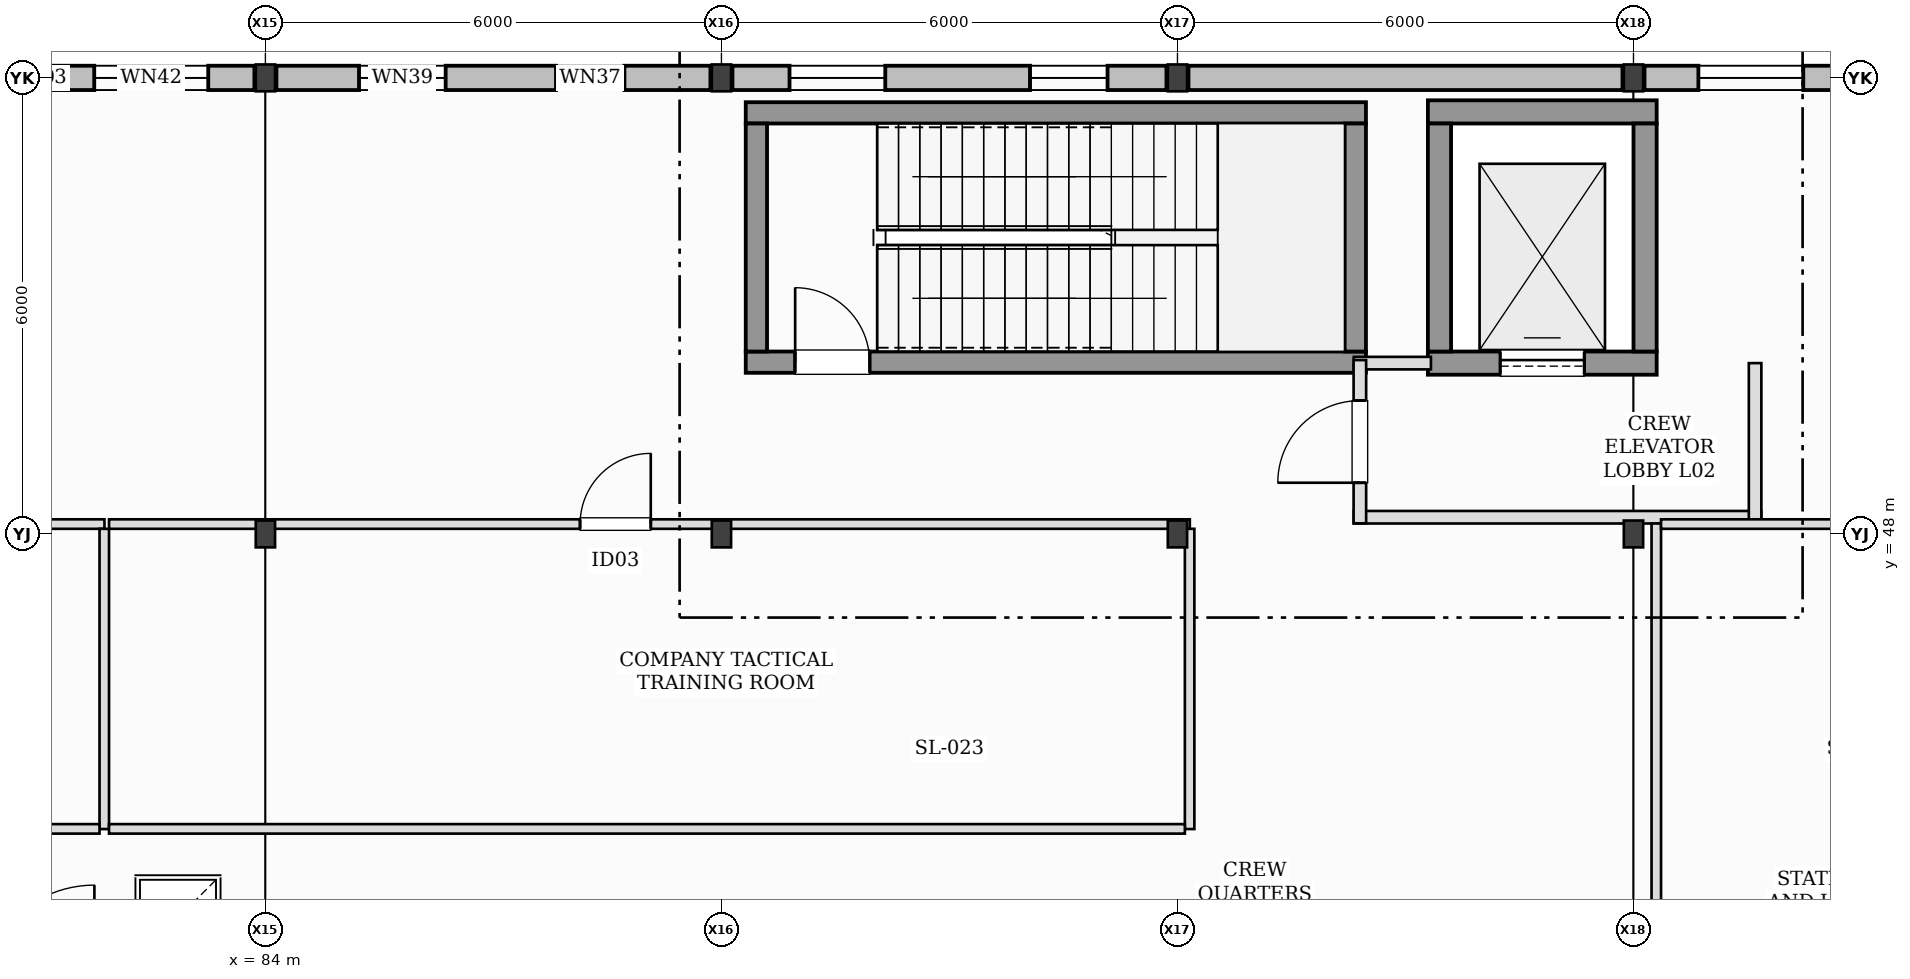
"""IFC4 building model, lengths in metres.
Left out: names, types, materials, properties, quantities, classifications, styles, units other than length and angle.
Written with IfcOpenShell. Run it as: python <this file> out.ifc"""

import sys

from ifc_helpers import new_model, si_unit, direction, frame, frame_2d, origin, origin_2d, place, context, subcontext, project, spatial, rectangle, i_section, extrude, element, fill, save


model = new_model("IFC4")
c1 = context("Model", 3, precision=1e-05, world=origin(), true_north=direction((0.0, 1.0)))
c2 = subcontext(c1, "Body", "Model", "MODEL_VIEW")
j1 = project(units=[si_unit("LENGTHUNIT", "METRE"), si_unit("PLANEANGLEUNIT", "RADIAN")], contexts=[c1])
p1 = place(None, origin())
s1 = spatial("IfcSite", under=j1, at=p1, CompositionType="ELEMENT")
p2 = place(p1, origin())
s2 = spatial("IfcBuilding", under=s1, at=p2, CompositionType="ELEMENT")
p3 = place(p2, frame((0.0, 0.0, 6.0)))
s3 = spatial("IfcBuildingStorey", under=s2, at=p3, CompositionType="ELEMENT", Elevation=6.0)
for number, where, z_axis, x_axis in (
    (1, (84.0, 48.0, 0.0), (0.0, 0.0, 1.0), (1.0, 0.0, 0.0)),
    (2, (84.0, 54.0, 0.0), (0.0, 0.0, 1.0), (1.0, 0.0, 0.0)),
    (3, (90.0, 48.0, 0.0), (0.0, 0.0, 1.0), (1.0, 0.0, 0.0)),
    (4, (90.0, 54.0, 0.0), (0.0, 0.0, 1.0), (1.0, 0.0, 0.0)),
    (5, (96.0, 48.0, 0.0), (0.0, 0.0, 1.0), (1.0, 0.0, 0.0)),
    (6, (96.0, 54.0, 0.0), (0.0, 0.0, 1.0), (1.0, 0.0, 0.0)),
    (7, (102.0, 48.0, 0.0), (0.0, 0.0, 1.0), (1.0, 0.0, 0.0)),
    (8, (102.0, 54.0, 0.0), (0.0, 0.0, 1.0), (1.0, 0.0, 0.0)),
):
    element("IfcColumn", number, at=place(p3, frame(where, z_axis=z_axis, x_axis=x_axis)), inside=s3, PredefinedType="COLUMN", context=c2, shape_type="SweptSolid", body=[
        extrude(i_section(OverallWidth=0.254, OverallDepth=0.353, WebThickness=0.01, FlangeThickness=0.016, at=origin_2d()), origin(), (0.0, 0.0, 1.0), 4.0),
    ])
p4 = place(p3, frame((83.855, 54.0, 0.0), z_axis=(0.0, 0.0, 1.0), x_axis=(-1.0, 0.0, 0.0)))
e9 = element("IfcWall", 9, at=p4, inside=s3, PredefinedType="STANDARD", context=c2, shape_type="SweptSolid", body=[
    extrude(rectangle(XDim=5.71, YDim=0.32, at=frame_2d((2.855, 0.0))), origin(), (0.0, 0.0, 1.0), 3.153),
])
p5 = place(p4, frame((0.607, 0.0, 0.86)))
e10 = element("IfcOpeningElement", 10, at=p5, cuts=e9, PredefinedType="OPENING", context=c2, shape_type="SweptSolid", body=[
    extrude(rectangle(XDim=1.5, YDim=1.5, at=frame_2d((0.75, 0.75))), frame((0.0, 0.17, 0.0), z_axis=(0.0, -1.0, 0.0), x_axis=(1.0, 0.0, 0.0)), (0.0, 0.0, 1.0), 0.34),
])
p6 = place(p4, frame((3.855, 0.0, 1.42)))
e11 = element("IfcOpeningElement", 11, at=p6, cuts=e9, PredefinedType="OPENING", context=c2, shape_type="SweptSolid", body=[
    extrude(rectangle(XDim=1.02, YDim=1.02, at=frame_2d((0.51, 0.51))), frame((0.0, 0.17, 0.0), z_axis=(0.0, -1.0, 0.0), x_axis=(1.0, 0.0, 0.0)), (0.0, 0.0, 1.0), 0.34),
])
p7 = place(p3, frame((89.855, 54.0, 0.0), z_axis=(0.0, 0.0, 1.0), x_axis=(-1.0, 0.0, 0.0)))
e12 = element("IfcWall", 12, at=p7, inside=s3, PredefinedType="STANDARD", context=c2, shape_type="SweptSolid", body=[
    extrude(rectangle(XDim=5.71, YDim=0.32, at=frame_2d((2.855, 0.0))), origin(), (0.0, 0.0, 1.0), 3.153),
])
p8 = place(p7, frame((1.131, 0.0, 1.18)))
e13 = element("IfcOpeningElement", 13, at=p8, cuts=e12, PredefinedType="OPENING", context=c2, shape_type="SweptSolid", body=[
    extrude(rectangle(XDim=0.9, YDim=0.9, at=frame_2d((0.45, 0.45))), frame((0.0, 0.17, 0.0), z_axis=(0.0, -1.0, 0.0), x_axis=(1.0, 0.0, 0.0)), (0.0, 0.0, 1.0), 0.34),
])
p9 = place(p7, frame((3.483, 0.0, 0.96)))
e14 = element("IfcOpeningElement", 14, at=p9, cuts=e12, PredefinedType="OPENING", context=c2, shape_type="SweptSolid", body=[
    extrude(rectangle(XDim=1.14, YDim=1.14, at=frame_2d((0.57, 0.57))), frame((0.0, 0.17, 0.0), z_axis=(0.0, -1.0, 0.0), x_axis=(1.0, 0.0, 0.0)), (0.0, 0.0, 1.0), 0.34),
])
p10 = place(p3, frame((95.855, 54.0, 0.0), z_axis=(0.0, 0.0, 1.0), x_axis=(-1.0, 0.0, 0.0)))
e15 = element("IfcWall", 15, at=p10, inside=s3, PredefinedType="STANDARD", context=c2, shape_type="SweptSolid", body=[
    extrude(rectangle(XDim=5.71, YDim=0.32, at=frame_2d((2.855, 0.0))), origin(), (0.0, 0.0, 1.0), 3.153),
])
p11 = place(p10, frame((0.775, 0.0, 1.42)))
e16 = element("IfcOpeningElement", 16, at=p11, cuts=e15, PredefinedType="OPENING", context=c2, shape_type="SweptSolid", body=[
    extrude(rectangle(XDim=1.02, YDim=1.02, at=frame_2d((0.51, 0.51))), frame((0.0, 0.17, 0.0), z_axis=(0.0, -1.0, 0.0), x_axis=(1.0, 0.0, 0.0)), (0.0, 0.0, 1.0), 0.34),
])
p12 = place(p10, frame((3.699, 0.0, 1.28)))
e17 = element("IfcOpeningElement", 17, at=p12, cuts=e15, PredefinedType="OPENING", context=c2, shape_type="SweptSolid", body=[
    extrude(rectangle(XDim=1.26, YDim=1.26, at=frame_2d((0.63, 0.63))), frame((0.0, 0.17, 0.0), z_axis=(0.0, -1.0, 0.0), x_axis=(1.0, 0.0, 0.0)), (0.0, 0.0, 1.0), 0.34),
])
p13 = place(p3, frame((101.855, 54.0, 0.0), z_axis=(0.0, 0.0, 1.0), x_axis=(-1.0, 0.0, 0.0)))
e18 = element("IfcWall", 18, at=p13, inside=s3, PredefinedType="STANDARD", context=c2, shape_type="SweptSolid", body=[
    extrude(rectangle(XDim=5.71, YDim=0.32, at=frame_2d((2.855, 0.0))), origin(), (0.0, 0.0, 1.0), 3.153),
])
p14 = place(p3, frame((107.855, 54.0, 0.0), z_axis=(0.0, 0.0, 1.0), x_axis=(-1.0, 0.0, 0.0)))
e19 = element("IfcWall", 19, at=p14, inside=s3, PredefinedType="STANDARD", context=c2, shape_type="SweptSolid", body=[
    extrude(rectangle(XDim=5.71, YDim=0.32, at=frame_2d((2.855, 0.0))), origin(), (0.0, 0.0, 1.0), 3.153),
])
p15 = place(p14, frame((0.733, 0.0, 1.28)))
e20 = element("IfcOpeningElement", 20, at=p15, cuts=e19, PredefinedType="OPENING", context=c2, shape_type="SweptSolid", body=[
    extrude(rectangle(XDim=1.14, YDim=1.14, at=frame_2d((0.57, 0.57))), frame((0.0, 0.17, 0.0), z_axis=(0.0, -1.0, 0.0), x_axis=(1.0, 0.0, 0.0)), (0.0, 0.0, 1.0), 0.34),
])
p16 = place(p14, frame((3.621, 0.0, 1.18)))
e21 = element("IfcOpeningElement", 21, at=p16, cuts=e19, PredefinedType="OPENING", context=c2, shape_type="SweptSolid", body=[
    extrude(rectangle(XDim=1.38, YDim=1.38, at=frame_2d((0.69, 0.69))), frame((0.0, 0.17, 0.0), z_axis=(0.0, -1.0, 0.0), x_axis=(1.0, 0.0, 0.0)), (0.0, 0.0, 1.0), 0.34),
])
p17 = place(p3, frame((90.32, 50.26, 0.0), z_axis=(0.0, 0.0, 1.0), x_axis=(1.0, 0.0, 0.0)))
e22 = element("IfcWall", 22, at=p17, inside=s3, PredefinedType="SHEAR", context=c2, shape_type="SweptSolid", body=[
    extrude(rectangle(XDim=8.16, YDim=0.28, at=frame_2d((4.08, 0.0))), origin(), (0.0, 0.0, 1.0), 4.0),
])
p18 = place(p17, frame((0.65, 0.0, 0.0)))
e23 = element("IfcOpeningElement", 23, at=p18, cuts=e22, PredefinedType="OPENING", context=c2, shape_type="SweptSolid", body=[
    extrude(rectangle(XDim=0.98, YDim=2.15, at=frame_2d((0.49, 1.075))), frame((0.0, 0.15, 0.0), z_axis=(0.0, -1.0, 0.0), x_axis=(1.0, 0.0, 0.0)), (0.0, 0.0, 1.0), 0.3),
])
p19 = place(p3, frame((98.48, 53.54, 0.0), z_axis=(0.0, 0.0, 1.0), x_axis=(-1.0, 0.0, 0.0)))
e24 = element("IfcWall", 24, at=p19, inside=s3, PredefinedType="SHEAR", context=c2, shape_type="SweptSolid", body=[
    extrude(rectangle(XDim=8.16, YDim=0.28, at=frame_2d((4.08, 0.0))), origin(), (0.0, 0.0, 1.0), 4.0),
])
for number, where, z_axis, x_axis in (
    (25, (90.46, 53.4, 0.0), (0.0, 0.0, 1.0), (0.0, -1.0, 0.0)),
    (26, (98.34, 50.4, 0.0), (0.0, 0.0, 1.0), (0.0, 1.0, 0.0)),
):
    element("IfcWall", number, at=place(p3, frame(where, z_axis=z_axis, x_axis=x_axis)), inside=s3, PredefinedType="SHEAR", context=c2, shape_type="SweptSolid", body=[
        extrude(rectangle(XDim=3.0, YDim=0.28, at=frame_2d((1.5, 0.0))), origin(), (0.0, 0.0, 1.0), 4.0),
    ])
p20 = place(p3, frame((99.295, 50.248, 0.0), z_axis=(0.0, 0.0, 1.0), x_axis=(1.0, 0.0, 0.0)))
e27 = element("IfcWall", 27, at=p20, inside=s3, PredefinedType="SHEAR", context=c2, shape_type="SweptSolid", body=[
    extrude(rectangle(XDim=3.01, YDim=0.305, at=frame_2d((1.505, 0.0))), origin(), (0.0, 0.0, 1.0), 4.0),
])
p21 = place(p20, frame((0.955, 0.0, 0.0)))
e28 = element("IfcOpeningElement", 28, at=p21, cuts=e27, PredefinedType="OPENING", context=c2, shape_type="SweptSolid", body=[
    extrude(rectangle(XDim=1.1, YDim=2.15, at=frame_2d((0.55, 1.075))), frame((0.0, 0.162, 0.0), z_axis=(0.0, -1.0, 0.0), x_axis=(1.0, 0.0, 0.0)), (0.0, 0.0, 1.0), 0.325),
])
p22 = place(p3, frame((102.305, 53.552, 0.0), z_axis=(0.0, 0.0, 1.0), x_axis=(-1.0, 0.0, 0.0)))
e29 = element("IfcWall", 29, at=p22, inside=s3, PredefinedType="SHEAR", context=c2, shape_type="SweptSolid", body=[
    extrude(rectangle(XDim=3.01, YDim=0.305, at=frame_2d((1.505, 0.0))), origin(), (0.0, 0.0, 1.0), 4.0),
])
for number, where, z_axis, x_axis in (
    (30, (99.448, 53.4, 0.0), (0.0, 0.0, 1.0), (0.0, -1.0, 0.0)),
    (31, (102.153, 50.4, 0.0), (0.0, 0.0, 1.0), (0.0, 1.0, 0.0)),
):
    element("IfcWall", number, at=place(p3, frame(where, z_axis=z_axis, x_axis=x_axis)), inside=s3, PredefinedType="SHEAR", context=c2, shape_type="SweptSolid", body=[
        extrude(rectangle(XDim=3.0, YDim=0.305, at=frame_2d((1.5, 0.0))), origin(), (0.0, 0.0, 1.0), 4.0),
    ])
p23 = place(p3, frame((98.32, 48.22, 0.0), z_axis=(0.0, 0.0, 1.0), x_axis=(1.0, 0.0, 0.0)))
e32 = element("IfcWall", 32, at=p23, inside=s3, PredefinedType="PARTITIONING", context=c2, shape_type="SweptSolid", body=[
    extrude(rectangle(XDim=5.36, YDim=0.165, at=frame_2d((2.68, 0.0))), origin(), (0.0, 0.0, 1.0), 3.153),
])
p24 = place(p3, frame((103.6, 48.14, 0.0), z_axis=(0.0, 0.0, 1.0), x_axis=(0.0, 1.0, 0.0)))
e33 = element("IfcWall", 33, at=p24, inside=s3, PredefinedType="PARTITIONING", context=c2, shape_type="SweptSolid", body=[
    extrude(rectangle(XDim=2.108, YDim=0.165, at=frame_2d((1.054, 0.0))), origin(), (0.0, 0.0, 1.0), 3.72),
])
p25 = place(p3, frame((98.32, 50.248, 0.0), z_axis=(0.0, 0.0, 1.0), x_axis=(1.0, 0.0, 0.0)))
e34 = element("IfcWall", 34, at=p25, inside=s3, PredefinedType="PARTITIONING", context=c2, shape_type="SweptSolid", body=[
    extrude(rectangle(XDim=1.015, YDim=0.165, at=frame_2d((0.507, 0.0))), origin(), (0.0, 0.0, 1.0), 3.72),
])
p26 = place(p3, frame((98.4, 48.14, 0.0), z_axis=(0.0, 0.0, 1.0), x_axis=(0.0, 1.0, 0.0)))
e35 = element("IfcWall", 35, at=p26, inside=s3, PredefinedType="PARTITIONING", context=c2, shape_type="SweptSolid", body=[
    extrude(rectangle(XDim=2.148, YDim=0.165, at=frame_2d((1.074, 0.0))), origin(), (0.0, 0.0, 1.0), 3.72),
])
p27 = place(p26, frame((0.534, 0.0, 0.0)))
e36 = element("IfcOpeningElement", 36, at=p27, cuts=e35, PredefinedType="OPENING", context=c2, shape_type="SweptSolid", body=[
    extrude(rectangle(XDim=1.08, YDim=2.14, at=frame_2d((0.54, 1.07))), frame((0.0, 0.093, 0.0), z_axis=(0.0, -1.0, 0.0), x_axis=(1.0, 0.0, 0.0)), (0.0, 0.0, 1.0), 0.185),
])
p28 = place(p3, frame((66.1, 48.13, 0.0), z_axis=(0.0, 0.0, 1.0), x_axis=(1.0, 0.0, 0.0)))
e37 = element("IfcWall", 37, at=p28, inside=s3, PredefinedType="PARTITIONING", context=c2, shape_type="SweptSolid", body=[
    extrude(rectangle(XDim=15.782, YDim=0.125, at=frame_2d((7.891, 0.0))), origin(), (0.0, 0.0, 1.0), 3.153),
])
p29 = place(p28, frame((7.3, 0.0, 0.0)))
e38 = element("IfcOpeningElement", 38, at=p29, cuts=e37, PredefinedType="OPENING", context=c2, shape_type="SweptSolid", body=[
    extrude(rectangle(XDim=0.96, YDim=2.15, at=frame_2d((0.48, 1.075))), frame((0.0, 0.073, 0.0), z_axis=(0.0, -1.0, 0.0), x_axis=(1.0, 0.0, 0.0)), (0.0, 0.0, 1.0), 0.145),
])
p30 = place(p3, frame((81.88, 48.067, 0.0), z_axis=(0.0, 0.0, 1.0), x_axis=(0.0, -1.0, 0.0)))
e39 = element("IfcWall", 39, at=p30, inside=s3, PredefinedType="PARTITIONING", context=c2, shape_type="SweptSolid", body=[
    extrude(rectangle(XDim=3.95, YDim=0.125, at=frame_2d((1.975, 0.0))), origin(), (0.0, 0.0, 1.0), 3.43),
])
p31 = place(p3, frame((81.817, 44.12, 0.0), z_axis=(0.0, 0.0, 1.0), x_axis=(-1.0, 0.0, 0.0)))
e40 = element("IfcWall", 40, at=p31, inside=s3, PredefinedType="PARTITIONING", context=c2, shape_type="SweptSolid", body=[
    extrude(rectangle(XDim=15.717, YDim=0.125, at=frame_2d((7.859, 0.0))), origin(), (0.0, 0.0, 1.0), 3.72),
])
p32 = place(p3, frame((81.942, 48.13, 0.0), z_axis=(0.0, 0.0, 1.0), x_axis=(1.0, 0.0, 0.0)))
e41 = element("IfcWall", 41, at=p32, inside=s3, PredefinedType="PARTITIONING", context=c2, shape_type="SweptSolid", body=[
    extrude(rectangle(XDim=14.22, YDim=0.125, at=frame_2d((7.11, 0.0))), origin(), (0.0, 0.0, 1.0), 3.153),
])
p33 = place(p32, frame((6.198, 0.0, 0.0)))
e42 = element("IfcOpeningElement", 42, at=p33, cuts=e41, PredefinedType="OPENING", context=c2, shape_type="SweptSolid", body=[
    extrude(rectangle(XDim=0.93, YDim=2.1, at=frame_2d((0.465, 1.05))), frame((0.0, 0.073, 0.0), z_axis=(0.0, -1.0, 0.0), x_axis=(1.0, 0.0, 0.0)), (0.0, 0.0, 1.0), 0.145),
])
p34 = place(p3, frame((96.16, 48.067, 0.0), z_axis=(0.0, 0.0, 1.0), x_axis=(0.0, -1.0, 0.0)))
e43 = element("IfcWall", 43, at=p34, inside=s3, PredefinedType="PARTITIONING", context=c2, shape_type="SweptSolid", body=[
    extrude(rectangle(XDim=3.95, YDim=0.125, at=frame_2d((1.975, 0.0))), origin(), (0.0, 0.0, 1.0), 3.157),
])
p35 = place(p3, frame((96.097, 44.12, 0.0), z_axis=(0.0, 0.0, 1.0), x_axis=(-1.0, 0.0, 0.0)))
e44 = element("IfcWall", 44, at=p35, inside=s3, PredefinedType="PARTITIONING", context=c2, shape_type="SweptSolid", body=[
    extrude(rectangle(XDim=14.155, YDim=0.125, at=frame_2d((7.078, 0.0))), origin(), (0.0, 0.0, 1.0), 3.72),
])
p36 = place(p3, frame((102.3, 37.335, 0.0), z_axis=(0.0, 0.0, 1.0), x_axis=(0.0, 1.0, 0.0)))
e45 = element("IfcWall", 45, at=p36, inside=s3, PredefinedType="PARTITIONING", context=c2, shape_type="SweptSolid", body=[
    extrude(rectangle(XDim=10.802, YDim=0.125, at=frame_2d((5.401, 0.0))), origin(), (0.0, 0.0, 1.0), 3.157),
])
p37 = place(p36, frame((0.16, 0.0, 0.0)))
e46 = element("IfcOpeningElement", 46, at=p37, cuts=e45, PredefinedType="OPENING", context=c2, shape_type="SweptSolid", body=[
    extrude(rectangle(XDim=0.87, YDim=2.06, at=frame_2d((0.435, 1.03))), frame((0.0, 0.073, 0.0), z_axis=(0.0, -1.0, 0.0), x_axis=(1.0, 0.0, 0.0)), (0.0, 0.0, 1.0), 0.145),
])
p38 = place(p3, frame((102.363, 48.13, 0.0), z_axis=(0.0, 0.0, 1.0), x_axis=(1.0, 0.0, 0.0)))
e47 = element("IfcWall", 47, at=p38, inside=s3, PredefinedType="PARTITIONING", context=c2, shape_type="SweptSolid", body=[
    extrude(rectangle(XDim=5.478, YDim=0.125, at=frame_2d((2.739, 0.0))), origin(), (0.0, 0.0, 1.0), 3.153),
])
p39 = place(p5, origin())
e48 = element("IfcWindow", 48, at=p39, inside=s3, PartitioningType="SINGLE_PANEL", PredefinedType="WINDOW", context=c2, shape_type="SweptSolid", body=[
    extrude(rectangle(XDim=1.5, YDim=1.5, at=frame_2d((0.75, 0.75))), frame((0.0, 0.03, 0.0), z_axis=(0.0, -1.0, 0.0), x_axis=(1.0, 0.0, 0.0)), (0.0, 0.0, 1.0), 0.06),
])
fill(e10, e48)
p40 = place(p8, origin())
e49 = element("IfcWindow", 49, at=p40, inside=s3, PartitioningType="SINGLE_PANEL", PredefinedType="WINDOW", context=c2, shape_type="SweptSolid", body=[
    extrude(rectangle(XDim=0.9, YDim=0.9, at=frame_2d((0.45, 0.45))), frame((0.0, 0.03, 0.0), z_axis=(0.0, -1.0, 0.0), x_axis=(1.0, 0.0, 0.0)), (0.0, 0.0, 1.0), 0.06),
])
fill(e13, e49)
p41 = place(p9, origin())
e50 = element("IfcWindow", 50, at=p41, inside=s3, PartitioningType="SINGLE_PANEL", PredefinedType="WINDOW", context=c2, shape_type="SweptSolid", body=[
    extrude(rectangle(XDim=1.14, YDim=1.14, at=frame_2d((0.57, 0.57))), frame((0.0, 0.03, 0.0), z_axis=(0.0, -1.0, 0.0), x_axis=(1.0, 0.0, 0.0)), (0.0, 0.0, 1.0), 0.06),
])
fill(e14, e50)
p42 = place(p11, origin())
e51 = element("IfcWindow", 51, at=p42, inside=s3, PartitioningType="SINGLE_PANEL", PredefinedType="WINDOW", context=c2, shape_type="SweptSolid", body=[
    extrude(rectangle(XDim=1.02, YDim=1.02, at=frame_2d((0.51, 0.51))), frame((0.0, 0.03, 0.0), z_axis=(0.0, -1.0, 0.0), x_axis=(1.0, 0.0, 0.0)), (0.0, 0.0, 1.0), 0.06),
])
fill(e16, e51)
p43 = place(p12, origin())
e52 = element("IfcWindow", 52, at=p43, inside=s3, PartitioningType="SINGLE_PANEL", PredefinedType="WINDOW", context=c2, shape_type="SweptSolid", body=[
    extrude(rectangle(XDim=1.26, YDim=1.26, at=frame_2d((0.63, 0.63))), frame((0.0, 0.03, 0.0), z_axis=(0.0, -1.0, 0.0), x_axis=(1.0, 0.0, 0.0)), (0.0, 0.0, 1.0), 0.06),
])
fill(e17, e52)
p44 = place(p16, origin())
e53 = element("IfcWindow", 53, at=p44, inside=s3, PartitioningType="SINGLE_PANEL", PredefinedType="WINDOW", context=c2, shape_type="SweptSolid", body=[
    extrude(rectangle(XDim=1.38, YDim=1.38, at=frame_2d((0.69, 0.69))), frame((0.0, 0.03, 0.0), z_axis=(0.0, -1.0, 0.0), x_axis=(1.0, 0.0, 0.0)), (0.0, 0.0, 1.0), 0.06),
])
fill(e21, e53)
p45 = place(p18, origin())
e54 = element("IfcDoor", 54, at=p45, inside=s3, OperationType="SINGLE_SWING_LEFT", PredefinedType="DOOR", context=c2, shape_type="SweptSolid", body=[
    extrude(rectangle(XDim=0.98, YDim=2.15, at=frame_2d((0.49, 1.075))), frame((0.0, 0.025, 0.0), z_axis=(0.0, -1.0, 0.0), x_axis=(1.0, 0.0, 0.0)), (0.0, 0.0, 1.0), 0.05),
])
fill(e23, e54)
p46 = place(p21, origin())
e55 = element("IfcDoor", 55, at=p46, inside=s3, OperationType="SLIDING_TO_LEFT", PredefinedType="DOOR", context=c2, shape_type="SweptSolid", body=[
    extrude(rectangle(XDim=1.1, YDim=2.15, at=frame_2d((0.55, 1.075))), frame((0.0, 0.025, 0.0), z_axis=(0.0, -1.0, 0.0), x_axis=(1.0, 0.0, 0.0)), (0.0, 0.0, 1.0), 0.05),
])
fill(e28, e55)
p47 = place(p27, frame((1.08, 0.0, 0.0), z_axis=(0.0, 0.0, 1.0), x_axis=(-1.0, 0.0, 0.0)))
e56 = element("IfcDoor", 56, at=p47, inside=s3, OperationType="SINGLE_SWING_LEFT", PredefinedType="DOOR", context=c2, shape_type="SweptSolid", body=[
    extrude(rectangle(XDim=1.08, YDim=2.14, at=frame_2d((0.54, 1.07))), frame((0.0, 0.025, 0.0), z_axis=(0.0, -1.0, 0.0), x_axis=(1.0, 0.0, 0.0)), (0.0, 0.0, 1.0), 0.05),
])
fill(e36, e56)
p48 = place(p33, frame((0.93, 0.0, 0.0), z_axis=(0.0, 0.0, 1.0), x_axis=(-1.0, 0.0, 0.0)))
e57 = element("IfcDoor", 57, at=p48, inside=s3, OperationType="SINGLE_SWING_RIGHT", PredefinedType="DOOR", context=c2, shape_type="SweptSolid", body=[
    extrude(rectangle(XDim=0.93, YDim=2.1, at=frame_2d((0.465, 1.05))), frame((0.0, 0.025, 0.0), z_axis=(0.0, -1.0, 0.0), x_axis=(1.0, 0.0, 0.0)), (0.0, 0.0, 1.0), 0.05),
])
fill(e42, e57)
save(model, sys.argv[1])
